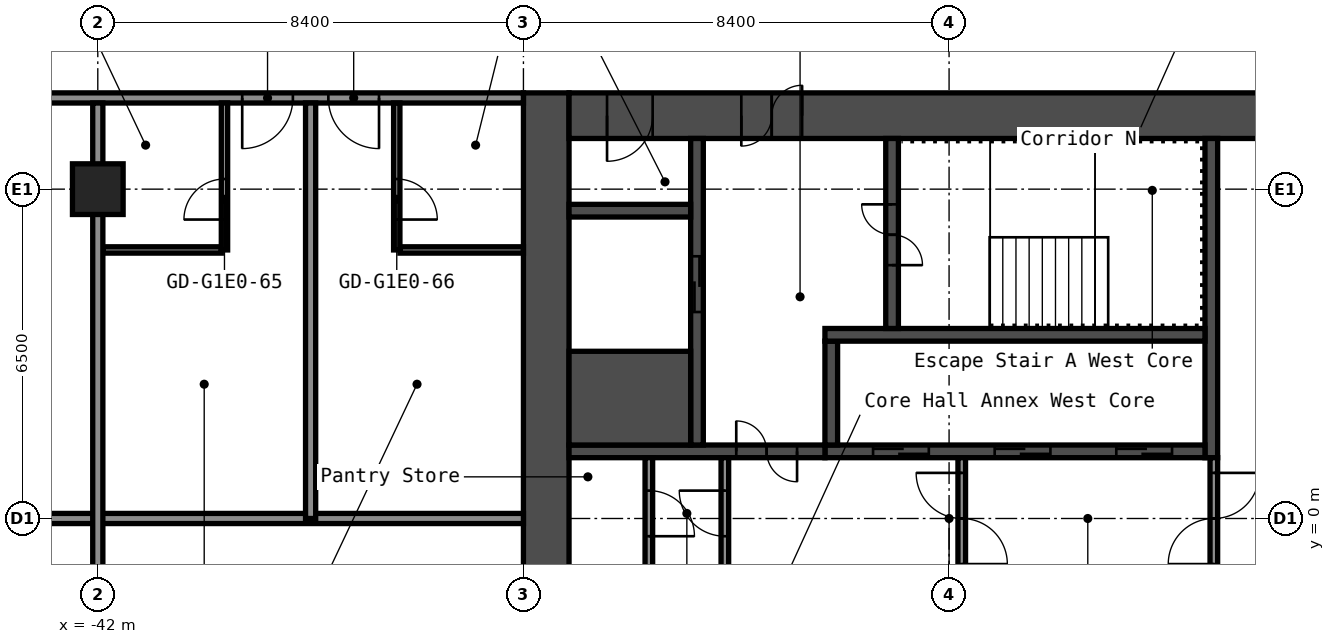
"""IFC4 building model, lengths in metres.
Left out: names, types, materials, properties, quantities, classifications, styles, units other than length and angle.
Written with IfcOpenShell. Run it as: python <this file> out.ifc"""

import sys

from ifc_helpers import new_model, si_unit, direction, frame, frame_2d, origin, origin_2d, place, context, subcontext, project, spatial, rectangle, hollow_rectangle, extrude, element, fill, save


model = new_model("IFC4")
c1 = context("Model", 3, precision=1e-05, world=origin(), true_north=direction((0.0, 1.0)))
c2 = subcontext(c1, "Body", "Model", "MODEL_VIEW")
j1 = project(units=[si_unit("LENGTHUNIT", "METRE"), si_unit("PLANEANGLEUNIT", "RADIAN")], contexts=[c1])
p1 = place(None, origin())
s1 = spatial("IfcSite", under=j1, at=p1, CompositionType="ELEMENT")
p2 = place(p1, origin())
s2 = spatial("IfcBuilding", under=s1, at=p2, CompositionType="ELEMENT")
p3 = place(p2, frame((0.0, 0.0, 32.6)))
s3 = spatial("IfcBuildingStorey", under=s2, at=p3, CompositionType="ELEMENT", Elevation=32.6)
p4 = place(p3, frame((-42.0, 6.5, 0.0), z_axis=(0.0, 0.0, 1.0), x_axis=(1.0, 0.0, 0.0)))
e1 = element("IfcColumn", 1, at=p4, inside=s3, PredefinedType="COLUMN", context=c2, shape_type="SweptSolid", body=[
    extrude(hollow_rectangle(XDim=1.0, YDim=1.0, WallThickness=0.04, at=origin_2d()), origin(), (0.0, 0.0, 1.0), 2.8),
])
p5 = place(p3, frame((-33.15, -8.4, 0.0), z_axis=(0.0, 0.0, 1.0), x_axis=(0.0, 1.0, 0.0)))
e2 = element("IfcWall", 2, at=p5, inside=s3, PredefinedType="SHEAR", context=c2, shape_type="SweptSolid", body=[
    extrude(rectangle(XDim=16.8, YDim=0.9, at=frame_2d((8.4, 0.0))), origin(), (0.0, 0.0, 1.0), 2.8),
])
p6 = place(p3, frame((-32.7, 7.95, 0.0), z_axis=(0.0, 0.0, 1.0), x_axis=(1.0, 0.0, 0.0)))
e3 = element("IfcWall", 3, at=p6, inside=s3, PredefinedType="SHEAR", context=c2, shape_type="SweptSolid", body=[
    extrude(rectangle(XDim=15.0, YDim=0.9, at=frame_2d((7.5, 0.0))), origin(), (0.0, 0.0, 1.0), 2.8),
])
p7 = place(p6, frame((3.4, 0.0, 0.0)))
e4 = element("IfcOpeningElement", 4, at=p7, cuts=e3, PredefinedType="OPENING", context=c2, shape_type="SweptSolid", body=[
    extrude(rectangle(XDim=1.2, YDim=2.1, at=frame_2d((0.6, 1.05))), frame((0.0, 0.46, 0.0), z_axis=(0.0, -1.0, 0.0), x_axis=(1.0, 0.0, 0.0)), (0.0, 0.0, 1.0), 0.92),
])
p8 = place(p6, frame((0.75, 0.0, 0.0)))
e5 = element("IfcOpeningElement", 5, at=p8, cuts=e3, PredefinedType="OPENING", context=c2, shape_type="SweptSolid", body=[
    extrude(rectangle(XDim=0.9, YDim=2.1, at=frame_2d((0.45, 1.05))), frame((0.0, 0.46, 0.0), z_axis=(0.0, -1.0, 0.0), x_axis=(1.0, 0.0, 0.0)), (0.0, 0.0, 1.0), 0.92),
])
p9 = place(p3, frame((-20.025, 1.2, 0.0), z_axis=(0.0, 0.0, 1.0), x_axis=(0.0, 1.0, 0.0)))
e6 = element("IfcWall", 6, at=p9, inside=s3, PredefinedType="SHEAR", context=c2, shape_type="SweptSolid", body=[
    extrude(rectangle(XDim=6.3, YDim=0.25, at=frame_2d((3.15, 0.0))), origin(), (0.0, 0.0, 1.0), 2.8),
])
p10 = place(p3, frame((-27.65, 1.325, 0.0), z_axis=(0.0, 0.0, 1.0), x_axis=(1.0, 0.0, 0.0)))
e7 = element("IfcWall", 7, at=p10, inside=s3, PredefinedType="SHEAR", context=c2, shape_type="SweptSolid", body=[
    extrude(rectangle(XDim=7.5, YDim=0.25, at=frame_2d((3.75, 0.0))), origin(), (0.0, 0.0, 1.0), 2.8),
])
p11 = place(p10, frame((5.75, 0.0, 0.0)))
e8 = element("IfcOpeningElement", 8, at=p11, cuts=e7, PredefinedType="OPENING", context=c2, shape_type="SweptSolid", body=[
    extrude(rectangle(XDim=1.1, YDim=2.1, at=frame_2d((0.55, 1.05))), frame((0.0, 0.135, 0.0), z_axis=(0.0, -1.0, 0.0), x_axis=(1.0, 0.0, 0.0)), (0.0, 0.0, 1.0), 0.27),
])
p12 = place(p10, frame((3.35, 0.0, 0.0)))
e9 = element("IfcOpeningElement", 9, at=p12, cuts=e7, PredefinedType="OPENING", context=c2, shape_type="SweptSolid", body=[
    extrude(rectangle(XDim=1.1, YDim=2.1, at=frame_2d((0.55, 1.05))), frame((0.0, 0.135, 0.0), z_axis=(0.0, -1.0, 0.0), x_axis=(1.0, 0.0, 0.0)), (0.0, 0.0, 1.0), 0.27),
])
p13 = place(p10, frame((0.95, 0.0, 0.0)))
e10 = element("IfcOpeningElement", 10, at=p13, cuts=e7, PredefinedType="OPENING", context=c2, shape_type="SweptSolid", body=[
    extrude(rectangle(XDim=1.1, YDim=2.1, at=frame_2d((0.55, 1.05))), frame((0.0, 0.135, 0.0), z_axis=(0.0, -1.0, 0.0), x_axis=(1.0, 0.0, 0.0)), (0.0, 0.0, 1.0), 0.27),
])
p14 = place(p3, frame((-27.525, 1.45, 0.0), z_axis=(0.0, 0.0, 1.0), x_axis=(0.0, 1.0, 0.0)))
e11 = element("IfcWall", 11, at=p14, inside=s3, PredefinedType="SHEAR", context=c2, shape_type="SweptSolid", body=[
    extrude(rectangle(XDim=2.05, YDim=0.25, at=frame_2d((1.025, 0.0))), origin(), (0.0, 0.0, 1.0), 2.8),
])
p15 = place(p3, frame((-27.65, 3.625, 0.0), z_axis=(0.0, 0.0, 1.0), x_axis=(1.0, 0.0, 0.0)))
e12 = element("IfcWall", 12, at=p15, inside=s3, PredefinedType="SHEAR", context=c2, shape_type="SweptSolid", body=[
    extrude(rectangle(XDim=7.5, YDim=0.25, at=frame_2d((3.75, 0.0))), origin(), (0.0, 0.0, 1.0), 2.8),
])
p16 = place(p3, frame((-26.325, 3.75, 0.0), z_axis=(0.0, 0.0, 1.0), x_axis=(0.0, 1.0, 0.0)))
e13 = element("IfcWall", 13, at=p16, inside=s3, PredefinedType="SHEAR", context=c2, shape_type="SweptSolid", body=[
    extrude(rectangle(XDim=3.75, YDim=0.25, at=frame_2d((1.875, 0.0))), origin(), (0.0, 0.0, 1.0), 2.8),
])
p17 = place(p16, frame((1.25, 0.0, 0.0)))
e14 = element("IfcOpeningElement", 14, at=p17, cuts=e13, PredefinedType="OPENING", context=c2, shape_type="SweptSolid", body=[
    extrude(rectangle(XDim=1.2, YDim=2.1, at=frame_2d((0.6, 1.05))), frame((0.0, 0.135, 0.0), z_axis=(0.0, -1.0, 0.0), x_axis=(1.0, 0.0, 0.0)), (0.0, 0.0, 1.0), 0.27),
])
p18 = place(p3, frame((-32.7, 1.325, 0.0), z_axis=(0.0, 0.0, 1.0), x_axis=(1.0, 0.0, 0.0)))
e15 = element("IfcWall", 15, at=p18, inside=s3, PredefinedType="SHEAR", context=c2, shape_type="SweptSolid", body=[
    extrude(rectangle(XDim=5.05, YDim=0.25, at=frame_2d((2.525, 0.0))), origin(), (0.0, 0.0, 1.0), 2.8),
])
p19 = place(p18, frame((3.3, 0.0, 0.0)))
e16 = element("IfcOpeningElement", 16, at=p19, cuts=e15, PredefinedType="OPENING", context=c2, shape_type="SweptSolid", body=[
    extrude(rectangle(XDim=1.2, YDim=2.1, at=frame_2d((0.6, 1.05))), frame((0.0, 0.135, 0.0), z_axis=(0.0, -1.0, 0.0), x_axis=(1.0, 0.0, 0.0)), (0.0, 0.0, 1.0), 0.27),
])
p20 = place(p3, frame((-30.175, 1.45, 0.0), z_axis=(0.0, 0.0, 1.0), x_axis=(0.0, 1.0, 0.0)))
e17 = element("IfcWall", 17, at=p20, inside=s3, PredefinedType="SHEAR", context=c2, shape_type="SweptSolid", body=[
    extrude(rectangle(XDim=6.05, YDim=0.25, at=frame_2d((3.025, 0.0))), origin(), (0.0, 0.0, 1.0), 2.8),
])
p21 = place(p20, frame((2.625, 0.0, 0.0)))
e18 = element("IfcOpeningElement", 18, at=p21, cuts=e17, PredefinedType="OPENING", context=c2, shape_type="SweptSolid", body=[
    extrude(rectangle(XDim=1.1, YDim=2.1, at=frame_2d((0.55, 1.05))), frame((0.0, 0.135, 0.0), z_axis=(0.0, -1.0, 0.0), x_axis=(1.0, 0.0, 0.0)), (0.0, 0.0, 1.0), 0.27),
])
p22 = place(p3, frame((-32.7, 2.375, 0.0), z_axis=(0.0, 0.0, 1.0), x_axis=(1.0, 0.0, 0.0)))
e19 = element("IfcWall", 19, at=p22, inside=s3, PredefinedType="SHEAR", context=c2, shape_type="SweptSolid", body=[
    extrude(rectangle(XDim=2.4, YDim=1.85, at=frame_2d((1.2, 0.0))), origin(), (0.0, 0.0, 1.0), 2.8),
])
p23 = place(p3, frame((-32.7, 6.075, 0.0), z_axis=(0.0, 0.0, 1.0), x_axis=(1.0, 0.0, 0.0)))
e20 = element("IfcWall", 20, at=p23, inside=s3, PredefinedType="SHEAR", context=c2, shape_type="SweptSolid", body=[
    extrude(rectangle(XDim=2.4, YDim=0.25, at=frame_2d((1.2, 0.0))), origin(), (0.0, 0.0, 1.0), 2.8),
])
p24 = place(p3, frame((-19.975, -1.2, 0.0), z_axis=(0.0, 0.0, 1.0), x_axis=(0.0, 1.0, 0.0)))
e21 = element("IfcWall", 21, at=p24, inside=s3, PredefinedType="PARTITIONING", context=c2, shape_type="SweptSolid", body=[
    extrude(rectangle(XDim=2.4, YDim=0.15, at=frame_2d((1.2, 0.0))), origin(), (0.0, 0.0, 1.0), 2.8),
])
p25 = place(p24, frame((0.3, 0.0, 0.0)))
e22 = element("IfcOpeningElement", 22, at=p25, cuts=e21, PredefinedType="OPENING", context=c2, shape_type="SweptSolid", body=[
    extrude(rectangle(XDim=1.8, YDim=2.1, at=frame_2d((0.9, 1.05))), frame((0.0, 0.085, 0.0), z_axis=(0.0, -1.0, 0.0), x_axis=(1.0, 0.0, 0.0)), (0.0, 0.0, 1.0), 0.17),
])
p26 = place(p3, frame((-24.95, -1.2, 0.0), z_axis=(0.0, 0.0, 1.0), x_axis=(0.0, 1.0, 0.0)))
e23 = element("IfcWall", 23, at=p26, inside=s3, PredefinedType="PARTITIONING", context=c2, shape_type="SweptSolid", body=[
    extrude(rectangle(XDim=2.4, YDim=0.15, at=frame_2d((1.2, 0.0))), origin(), (0.0, 0.0, 1.0), 2.8),
])
p27 = place(p26, frame((0.3, 0.0, 0.0)))
e24 = element("IfcOpeningElement", 24, at=p27, cuts=e23, PredefinedType="OPENING", context=c2, shape_type="SweptSolid", body=[
    extrude(rectangle(XDim=1.8, YDim=2.1, at=frame_2d((0.9, 1.05))), frame((0.0, 0.085, 0.0), z_axis=(0.0, -1.0, 0.0), x_axis=(1.0, 0.0, 0.0)), (0.0, 0.0, 1.0), 0.17),
])
p28 = place(p3, frame((-29.625, -1.15, 0.0), z_axis=(0.0, 0.0, 1.0), x_axis=(0.0, 1.0, 0.0)))
e25 = element("IfcWall", 25, at=p28, inside=s3, PredefinedType="PARTITIONING", context=c2, shape_type="SweptSolid", body=[
    extrude(rectangle(XDim=2.35, YDim=0.15, at=frame_2d((1.175, 0.0))), origin(), (0.0, 0.0, 1.0), 2.8),
])
p29 = place(p28, frame((0.8, 0.0, 0.0)))
e26 = element("IfcOpeningElement", 26, at=p29, cuts=e25, PredefinedType="OPENING", context=c2, shape_type="SweptSolid", body=[
    extrude(rectangle(XDim=0.9, YDim=2.1, at=frame_2d((0.45, 1.05))), frame((0.0, 0.085, 0.0), z_axis=(0.0, -1.0, 0.0), x_axis=(1.0, 0.0, 0.0)), (0.0, 0.0, 1.0), 0.17),
])
p30 = place(p3, frame((-31.125, -1.0, 0.0), z_axis=(0.0, 0.0, 1.0), x_axis=(0.0, 1.0, 0.0)))
e27 = element("IfcWall", 27, at=p30, inside=s3, PredefinedType="PARTITIONING", context=c2, shape_type="SweptSolid", body=[
    extrude(rectangle(XDim=2.2, YDim=0.15, at=frame_2d((1.1, 0.0))), origin(), (0.0, 0.0, 1.0), 2.8),
])
p31 = place(p30, frame((0.65, 0.0, 0.0)))
e28 = element("IfcOpeningElement", 28, at=p31, cuts=e27, PredefinedType="OPENING", context=c2, shape_type="SweptSolid", body=[
    extrude(rectangle(XDim=0.9, YDim=2.1, at=frame_2d((0.45, 1.05))), frame((0.0, 0.085, 0.0), z_axis=(0.0, -1.0, 0.0), x_axis=(1.0, 0.0, 0.0)), (0.0, 0.0, 1.0), 0.17),
])
p32 = place(p3, frame((-48.5, 0.0, 0.0), z_axis=(0.0, 0.0, 1.0), x_axis=(1.0, 0.0, 0.0)))
e29 = element("IfcWall", 29, at=p32, inside=s3, PredefinedType="PARTITIONING", context=c2, shape_type="SweptSolid", body=[
    extrude(rectangle(XDim=14.9, YDim=0.2, at=frame_2d((7.45, 0.0))), origin(), (0.0, 0.0, 1.0), 2.8),
])
p33 = place(p3, frame((-41.9, 5.3, 0.0), z_axis=(0.0, 0.0, 1.0), x_axis=(1.0, 0.0, 0.0)))
e30 = element("IfcWall", 30, at=p33, inside=s3, PredefinedType="PARTITIONING", context=c2, shape_type="SweptSolid", body=[
    extrude(rectangle(XDim=2.337, YDim=0.125, at=frame_2d((1.169, 0.0))), origin(), (0.0, 0.0, 1.0), 2.8),
])
p34 = place(p3, frame((-36.038, 5.3, 0.0), z_axis=(0.0, 0.0, 1.0), x_axis=(1.0, 0.0, 0.0)))
e31 = element("IfcWall", 31, at=p34, inside=s3, PredefinedType="PARTITIONING", context=c2, shape_type="SweptSolid", body=[
    extrude(rectangle(XDim=2.438, YDim=0.125, at=frame_2d((1.219, 0.0))), origin(), (0.0, 0.0, 1.0), 2.8),
])
p35 = place(p3, frame((-48.6, 8.3, 0.0), z_axis=(0.0, 0.0, 1.0), x_axis=(1.0, 0.0, 0.0)))
e32 = element("IfcWall", 32, at=p35, inside=s3, PredefinedType="PARTITIONING", context=c2, shape_type="SweptSolid", body=[
    extrude(rectangle(XDim=15.0, YDim=0.2, at=frame_2d((7.5, 0.0))), origin(), (0.0, 0.0, 1.0), 2.8),
])
p36 = place(p35, frame((4.05, 0.0, 0.0)))
e33 = element("IfcOpeningElement", 33, at=p36, cuts=e32, PredefinedType="OPENING", context=c2, shape_type="SweptSolid", body=[
    extrude(rectangle(XDim=1.0, YDim=2.1, at=frame_2d((0.5, 1.05))), frame((0.0, 0.11, 0.0), z_axis=(0.0, -1.0, 0.0), x_axis=(1.0, 0.0, 0.0)), (0.0, 0.0, 1.0), 0.22),
])
p37 = place(p35, frame((9.45, 0.0, 0.0)))
e34 = element("IfcOpeningElement", 34, at=p37, cuts=e32, PredefinedType="OPENING", context=c2, shape_type="SweptSolid", body=[
    extrude(rectangle(XDim=1.0, YDim=2.1, at=frame_2d((0.5, 1.05))), frame((0.0, 0.11, 0.0), z_axis=(0.0, -1.0, 0.0), x_axis=(1.0, 0.0, 0.0)), (0.0, 0.0, 1.0), 0.22),
])
p38 = place(p35, frame((11.15, 0.0, 0.0)))
e35 = element("IfcOpeningElement", 35, at=p38, cuts=e32, PredefinedType="OPENING", context=c2, shape_type="SweptSolid", body=[
    extrude(rectangle(XDim=1.0, YDim=2.1, at=frame_2d((0.5, 1.05))), frame((0.0, 0.11, 0.0), z_axis=(0.0, -1.0, 0.0), x_axis=(1.0, 0.0, 0.0)), (0.0, 0.0, 1.0), 0.22),
])
p39 = place(p3, frame((-42.0, -8.2, 0.0), z_axis=(0.0, 0.0, 1.0), x_axis=(0.0, 1.0, 0.0)))
e36 = element("IfcWall", 36, at=p39, inside=s3, PredefinedType="PARTITIONING", context=c2, shape_type="SweptSolid", body=[
    extrude(rectangle(XDim=16.4, YDim=0.2, at=frame_2d((8.2, 0.0))), origin(), (0.0, 0.0, 1.0), 2.8),
])
p40 = place(p3, frame((-39.5, 5.3, 0.0), z_axis=(0.0, 0.0, 1.0), x_axis=(0.0, 1.0, 0.0)))
e37 = element("IfcWall", 37, at=p40, inside=s3, PredefinedType="PARTITIONING", context=c2, shape_type="SweptSolid", body=[
    extrude(rectangle(XDim=2.9, YDim=0.125, at=frame_2d((1.45, 0.0))), origin(), (0.0, 0.0, 1.0), 2.8),
])
p41 = place(p40, frame((0.6, 0.0, 0.0)))
e38 = element("IfcOpeningElement", 38, at=p41, cuts=e37, PredefinedType="OPENING", context=c2, shape_type="SweptSolid", body=[
    extrude(rectangle(XDim=0.8, YDim=2.1, at=frame_2d((0.4, 1.05))), frame((0.0, 0.073, 0.0), z_axis=(0.0, -1.0, 0.0), x_axis=(1.0, 0.0, 0.0)), (0.0, 0.0, 1.0), 0.145),
])
p42 = place(p3, frame((-37.8, 0.0, 0.0), z_axis=(0.0, 0.0, 1.0), x_axis=(0.0, 1.0, 0.0)))
e39 = element("IfcWall", 39, at=p42, inside=s3, PredefinedType="PARTITIONING", context=c2, shape_type="SweptSolid", body=[
    extrude(rectangle(XDim=8.2, YDim=0.2, at=frame_2d((4.1, 0.0))), origin(), (0.0, 0.0, 1.0), 2.8),
])
p43 = place(p3, frame((-36.1, 5.3, 0.0), z_axis=(0.0, 0.0, 1.0), x_axis=(0.0, 1.0, 0.0)))
e40 = element("IfcWall", 40, at=p43, inside=s3, PredefinedType="PARTITIONING", context=c2, shape_type="SweptSolid", body=[
    extrude(rectangle(XDim=2.9, YDim=0.125, at=frame_2d((1.45, 0.0))), origin(), (0.0, 0.0, 1.0), 2.8),
])
p44 = place(p43, frame((0.6, 0.0, 0.0)))
e41 = element("IfcOpeningElement", 41, at=p44, cuts=e40, PredefinedType="OPENING", context=c2, shape_type="SweptSolid", body=[
    extrude(rectangle(XDim=0.8, YDim=2.1, at=frame_2d((0.4, 1.05))), frame((0.0, 0.073, 0.0), z_axis=(0.0, -1.0, 0.0), x_axis=(1.0, 0.0, 0.0)), (0.0, 0.0, 1.0), 0.145),
])
p45 = place(p7, origin())
e42 = element("IfcDoor", 42, at=p45, inside=s3, OperationType="DOUBLE_DOOR_SINGLE_SWING", PredefinedType="DOOR", context=c2, shape_type="SweptSolid", body=[
    extrude(rectangle(XDim=1.2, YDim=2.1, at=frame_2d((0.6, 1.05))), frame((0.0, 0.025, 0.0), z_axis=(0.0, -1.0, 0.0), x_axis=(1.0, 0.0, 0.0)), (0.0, 0.0, 1.0), 0.05),
])
fill(e4, e42)
p46 = place(p8, origin())
e43 = element("IfcDoor", 43, at=p46, inside=s3, OperationType="SINGLE_SWING_LEFT", PredefinedType="DOOR", context=c2, shape_type="SweptSolid", body=[
    extrude(rectangle(XDim=0.9, YDim=2.1, at=frame_2d((0.45, 1.05))), frame((0.0, 0.025, 0.0), z_axis=(0.0, -1.0, 0.0), x_axis=(1.0, 0.0, 0.0)), (0.0, 0.0, 1.0), 0.05),
])
fill(e5, e43)
p47 = place(p17, origin())
e44 = element("IfcDoor", 44, at=p47, inside=s3, OperationType="DOUBLE_DOOR_SINGLE_SWING", PredefinedType="DOOR", context=c2, shape_type="SweptSolid", body=[
    extrude(rectangle(XDim=1.2, YDim=2.1, at=frame_2d((0.6, 1.05))), frame((0.0, 0.025, 0.0), z_axis=(0.0, -1.0, 0.0), x_axis=(1.0, 0.0, 0.0)), (0.0, 0.0, 1.0), 0.05),
])
fill(e14, e44)
p48 = place(p19, origin())
e45 = element("IfcDoor", 45, at=p48, inside=s3, OperationType="DOUBLE_DOOR_SINGLE_SWING", PredefinedType="DOOR", context=c2, shape_type="SweptSolid", body=[
    extrude(rectangle(XDim=1.2, YDim=2.1, at=frame_2d((0.6, 1.05))), frame((0.0, 0.025, 0.0), z_axis=(0.0, -1.0, 0.0), x_axis=(1.0, 0.0, 0.0)), (0.0, 0.0, 1.0), 0.05),
])
fill(e16, e45)
p49 = place(p25, origin())
e46 = element("IfcDoor", 46, at=p49, inside=s3, OperationType="DOUBLE_DOOR_SINGLE_SWING", PredefinedType="DOOR", context=c2, shape_type="SweptSolid", body=[
    extrude(rectangle(XDim=1.8, YDim=2.1, at=frame_2d((0.9, 1.05))), frame((0.0, 0.025, 0.0), z_axis=(0.0, -1.0, 0.0), x_axis=(1.0, 0.0, 0.0)), (0.0, 0.0, 1.0), 0.05),
])
fill(e22, e46)
p50 = place(p27, origin())
e47 = element("IfcDoor", 47, at=p50, inside=s3, OperationType="DOUBLE_DOOR_SINGLE_SWING", PredefinedType="DOOR", context=c2, shape_type="SweptSolid", body=[
    extrude(rectangle(XDim=1.8, YDim=2.1, at=frame_2d((0.9, 1.05))), frame((0.0, 0.025, 0.0), z_axis=(0.0, -1.0, 0.0), x_axis=(1.0, 0.0, 0.0)), (0.0, 0.0, 1.0), 0.05),
])
fill(e24, e47)
p51 = place(p29, origin())
e48 = element("IfcDoor", 48, at=p51, inside=s3, OperationType="SINGLE_SWING_LEFT", PredefinedType="DOOR", context=c2, shape_type="SweptSolid", body=[
    extrude(rectangle(XDim=0.9, YDim=2.1, at=frame_2d((0.45, 1.05))), frame((0.0, 0.025, 0.0), z_axis=(0.0, -1.0, 0.0), x_axis=(1.0, 0.0, 0.0)), (0.0, 0.0, 1.0), 0.05),
])
fill(e26, e48)
p52 = place(p31, origin())
e49 = element("IfcDoor", 49, at=p52, inside=s3, OperationType="SINGLE_SWING_LEFT", PredefinedType="DOOR", context=c2, shape_type="SweptSolid", body=[
    extrude(rectangle(XDim=0.9, YDim=2.1, at=frame_2d((0.45, 1.05))), frame((0.0, 0.025, 0.0), z_axis=(0.0, -1.0, 0.0), x_axis=(1.0, 0.0, 0.0)), (0.0, 0.0, 1.0), 0.05),
])
fill(e28, e49)
p53 = place(p11, origin())
e50 = element("IfcDoor", 50, at=p53, inside=s3, OperationType="DOUBLE_DOOR_SLIDING", PredefinedType="DOOR", context=c2, shape_type="SweptSolid", body=[
    extrude(rectangle(XDim=1.1, YDim=2.1, at=frame_2d((0.55, 1.05))), frame((0.0, 0.025, 0.0), z_axis=(0.0, -1.0, 0.0), x_axis=(1.0, 0.0, 0.0)), (0.0, 0.0, 1.0), 0.05),
])
fill(e8, e50)
p54 = place(p12, origin())
e51 = element("IfcDoor", 51, at=p54, inside=s3, OperationType="DOUBLE_DOOR_SLIDING", PredefinedType="DOOR", context=c2, shape_type="SweptSolid", body=[
    extrude(rectangle(XDim=1.1, YDim=2.1, at=frame_2d((0.55, 1.05))), frame((0.0, 0.025, 0.0), z_axis=(0.0, -1.0, 0.0), x_axis=(1.0, 0.0, 0.0)), (0.0, 0.0, 1.0), 0.05),
])
fill(e9, e51)
p55 = place(p13, origin())
e52 = element("IfcDoor", 52, at=p55, inside=s3, OperationType="DOUBLE_DOOR_SLIDING", PredefinedType="DOOR", context=c2, shape_type="SweptSolid", body=[
    extrude(rectangle(XDim=1.1, YDim=2.1, at=frame_2d((0.55, 1.05))), frame((0.0, 0.025, 0.0), z_axis=(0.0, -1.0, 0.0), x_axis=(1.0, 0.0, 0.0)), (0.0, 0.0, 1.0), 0.05),
])
fill(e10, e52)
p56 = place(p21, origin())
e53 = element("IfcDoor", 53, at=p56, inside=s3, OperationType="DOUBLE_DOOR_SLIDING", PredefinedType="DOOR", context=c2, shape_type="SweptSolid", body=[
    extrude(rectangle(XDim=1.1, YDim=2.1, at=frame_2d((0.55, 1.05))), frame((0.0, 0.025, 0.0), z_axis=(0.0, -1.0, 0.0), x_axis=(1.0, 0.0, 0.0)), (0.0, 0.0, 1.0), 0.05),
])
fill(e18, e53)
p57 = place(p37, origin())
e54 = element("IfcDoor", 54, at=p57, inside=s3, OperationType="SINGLE_SWING_LEFT", PredefinedType="DOOR", context=c2, shape_type="SweptSolid", body=[
    extrude(rectangle(XDim=1.0, YDim=2.1, at=frame_2d((0.5, 1.05))), frame((0.0, 0.025, 0.0), z_axis=(0.0, -1.0, 0.0), x_axis=(1.0, 0.0, 0.0)), (0.0, 0.0, 1.0), 0.05),
])
fill(e34, e54)
p58 = place(p38, origin())
e55 = element("IfcDoor", 55, at=p58, inside=s3, OperationType="SINGLE_SWING_RIGHT", PredefinedType="DOOR", context=c2, shape_type="SweptSolid", body=[
    extrude(rectangle(XDim=1.0, YDim=2.1, at=frame_2d((0.5, 1.05))), frame((0.0, 0.025, 0.0), z_axis=(0.0, -1.0, 0.0), x_axis=(1.0, 0.0, 0.0)), (0.0, 0.0, 1.0), 0.05),
])
fill(e35, e55)
p59 = place(p41, origin())
e56 = element("IfcDoor", 56, at=p59, inside=s3, OperationType="SINGLE_SWING_RIGHT", PredefinedType="DOOR", context=c2, shape_type="SweptSolid", body=[
    extrude(rectangle(XDim=0.8, YDim=2.1, at=frame_2d((0.4, 1.05))), frame((0.0, 0.025, 0.0), z_axis=(0.0, -1.0, 0.0), x_axis=(1.0, 0.0, 0.0)), (0.0, 0.0, 1.0), 0.05),
])
fill(e38, e56)
p60 = place(p44, origin())
e57 = element("IfcDoor", 57, at=p60, inside=s3, OperationType="SINGLE_SWING_LEFT", PredefinedType="DOOR", context=c2, shape_type="SweptSolid", body=[
    extrude(rectangle(XDim=0.8, YDim=2.1, at=frame_2d((0.4, 1.05))), frame((0.0, 0.025, 0.0), z_axis=(0.0, -1.0, 0.0), x_axis=(1.0, 0.0, 0.0)), (0.0, 0.0, 1.0), 0.05),
])
fill(e41, e57)
save(model, sys.argv[1])
